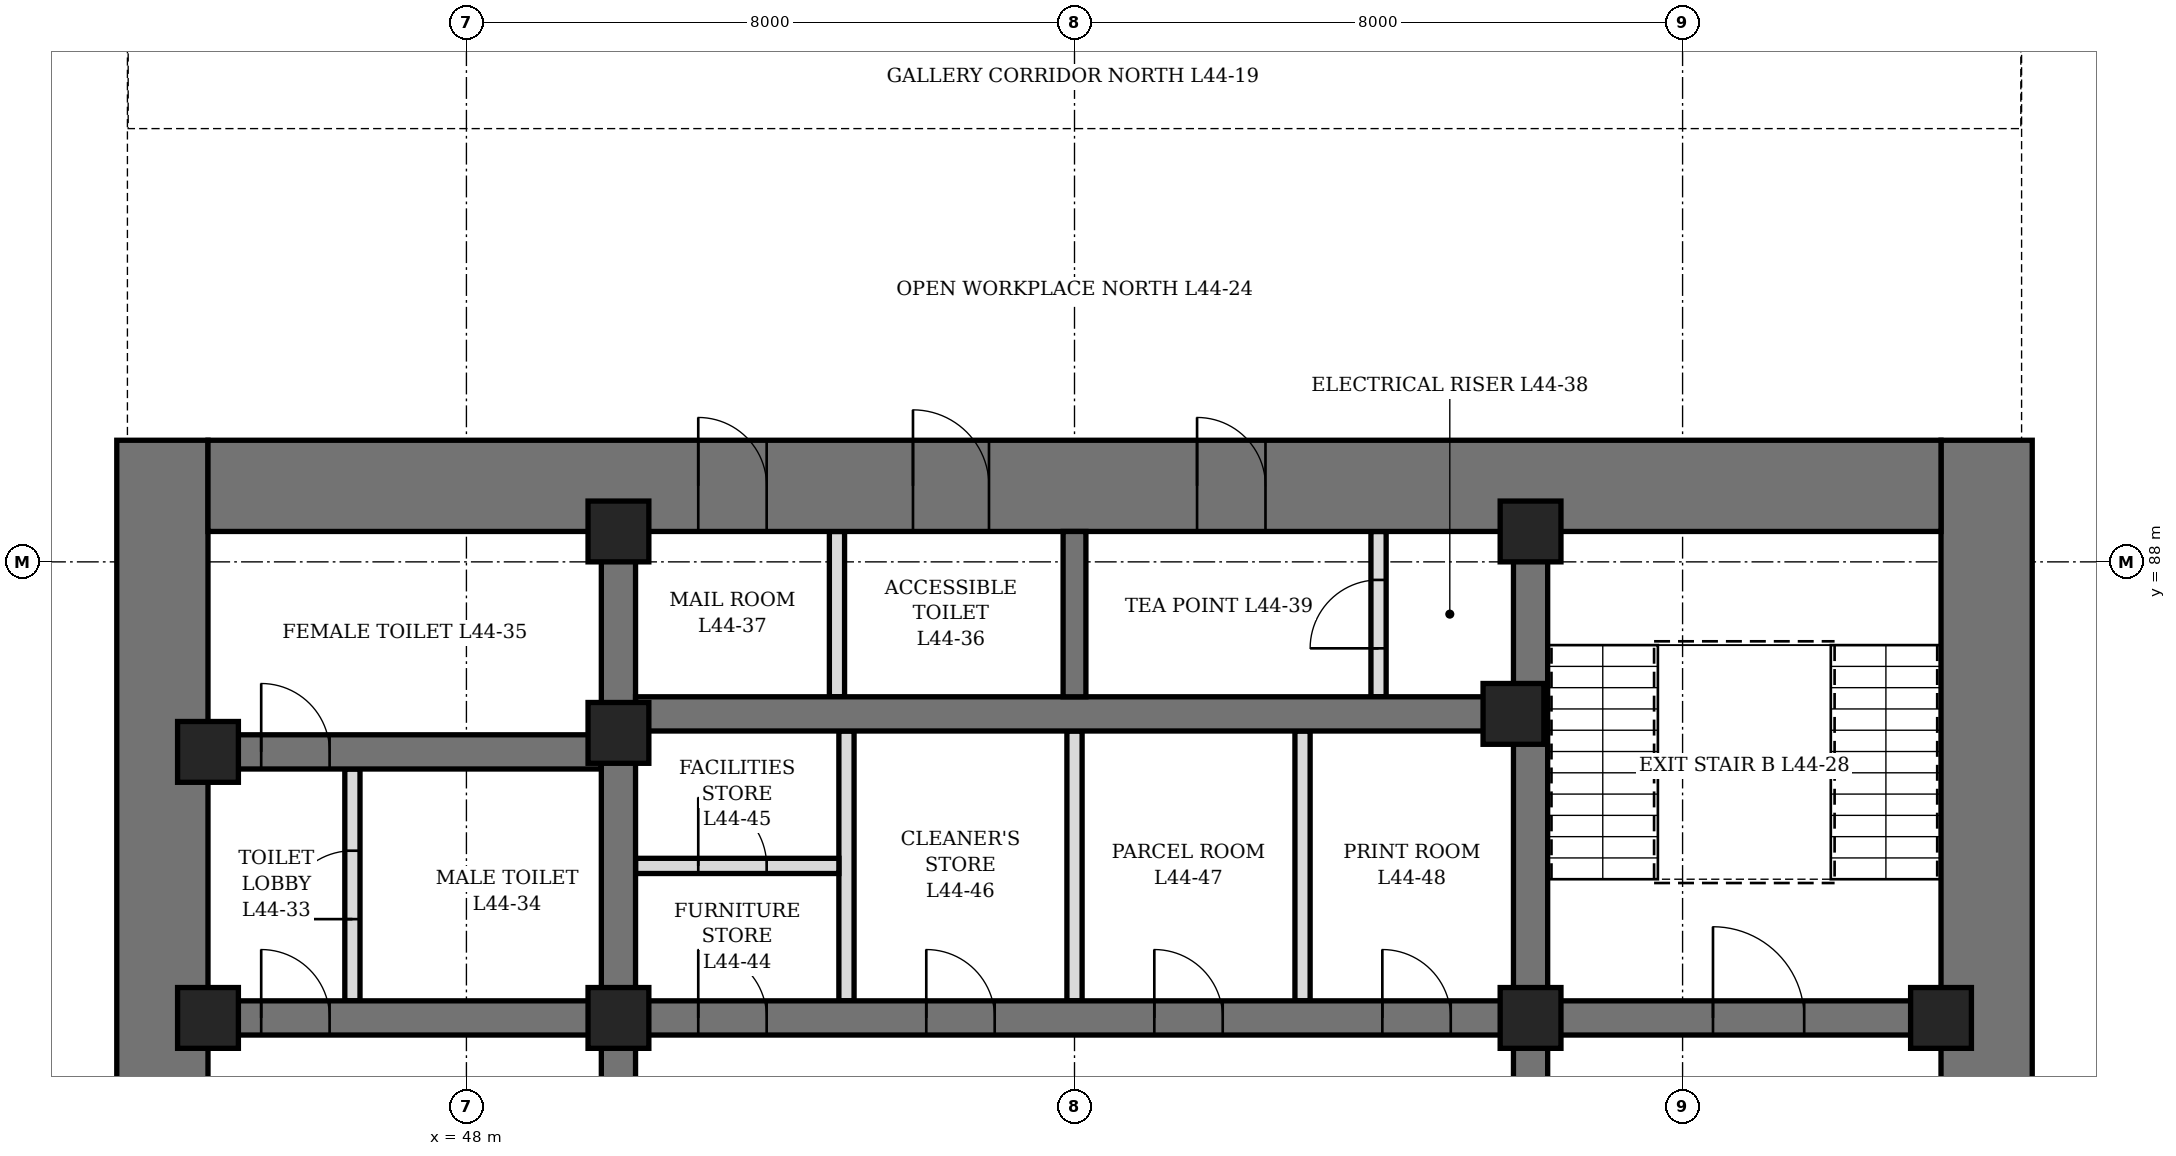
"""IFC4 building model, lengths in metres.
Left out: names, types, materials, properties, quantities, classifications, styles, units other than length and angle.
Written with IfcOpenShell. Run it as: python <this file> out.ifc"""

import sys

from ifc_helpers import new_model, si_unit, direction, frame, frame_2d, origin, origin_2d, place, context, subcontext, project, spatial, rectangle, hollow_rectangle, extrude, element, fill, save


model = new_model("IFC4")
c1 = context("Model", 3, precision=1e-05, world=origin(), true_north=direction((0.0, 1.0)))
c2 = subcontext(c1, "Body", "Model", "MODEL_VIEW")
j1 = project(units=[si_unit("LENGTHUNIT", "METRE"), si_unit("PLANEANGLEUNIT", "RADIAN")], contexts=[c1])
p1 = place(None, origin())
s1 = spatial("IfcSite", under=j1, at=p1, CompositionType="ELEMENT")
p2 = place(p1, origin())
s2 = spatial("IfcBuilding", under=s1, at=p2, CompositionType="ELEMENT")
p3 = place(p2, frame((0.0, 0.0, 198.1)))
s3 = spatial("IfcBuildingStorey", under=s2, at=p3, CompositionType="ELEMENT", Elevation=198.1)
p4 = place(p3, frame((44.0, 70.4, 0.0), z_axis=(0.0, 0.0, 1.0), x_axis=(0.0, 1.0, 0.0)))
e1 = element("IfcWall", 1, at=p4, inside=s3, PredefinedType="SHEAR", context=c2, shape_type="SweptSolid", body=[
    extrude(rectangle(XDim=19.2, YDim=1.2, at=frame_2d((9.6, 0.0))), origin(), (0.0, 0.0, 1.0), 4.2),
])
p5 = place(p4, frame((8.6, 0.0, 0.0)))
e2 = element("IfcOpeningElement", 2, at=p5, cuts=e1, PredefinedType="OPENING", context=c2, shape_type="SweptSolid", body=[
    extrude(rectangle(XDim=2.0, YDim=2.4, at=frame_2d((1.0, 1.2))), frame((0.0, 0.61, 0.0), z_axis=(0.0, -1.0, 0.0), x_axis=(1.0, 0.0, 0.0)), (0.0, 0.0, 1.0), 1.22),
])
p6 = place(p3, frame((68.0, 70.4, 0.0), z_axis=(0.0, 0.0, 1.0), x_axis=(0.0, 1.0, 0.0)))
e3 = element("IfcWall", 3, at=p6, inside=s3, PredefinedType="SHEAR", context=c2, shape_type="SweptSolid", body=[
    extrude(rectangle(XDim=19.2, YDim=1.2, at=frame_2d((9.6, 0.0))), origin(), (0.0, 0.0, 1.0), 4.2),
])
p7 = place(p6, frame((8.6, 0.0, 0.0)))
e4 = element("IfcOpeningElement", 4, at=p7, cuts=e3, PredefinedType="OPENING", context=c2, shape_type="SweptSolid", body=[
    extrude(rectangle(XDim=2.0, YDim=2.4, at=frame_2d((1.0, 1.2))), frame((0.0, 0.61, 0.0), z_axis=(0.0, -1.0, 0.0), x_axis=(1.0, 0.0, 0.0)), (0.0, 0.0, 1.0), 1.22),
])
p8 = place(p3, frame((44.6, 89.0, 0.0), z_axis=(0.0, 0.0, 1.0), x_axis=(1.0, 0.0, 0.0)))
e5 = element("IfcWall", 5, at=p8, inside=s3, PredefinedType="SHEAR", context=c2, shape_type="SweptSolid", body=[
    extrude(rectangle(XDim=22.8, YDim=1.2, at=frame_2d((11.4, 0.0))), origin(), (0.0, 0.0, 1.0), 4.2),
])
p9 = place(p8, frame((9.275, 0.0, 0.0)))
e6 = element("IfcOpeningElement", 6, at=p9, cuts=e5, PredefinedType="OPENING", context=c2, shape_type="SweptSolid", body=[
    extrude(rectangle(XDim=1.0, YDim=2.1, at=frame_2d((0.5, 1.05))), frame((0.0, 0.61, 0.0), z_axis=(0.0, -1.0, 0.0), x_axis=(1.0, 0.0, 0.0)), (0.0, 0.0, 1.0), 1.22),
])
p10 = place(p8, frame((6.45, 0.0, 0.0)))
e7 = element("IfcOpeningElement", 7, at=p10, cuts=e5, PredefinedType="OPENING", context=c2, shape_type="SweptSolid", body=[
    extrude(rectangle(XDim=0.9, YDim=2.1, at=frame_2d((0.45, 1.05))), frame((0.0, 0.61, 0.0), z_axis=(0.0, -1.0, 0.0), x_axis=(1.0, 0.0, 0.0)), (0.0, 0.0, 1.0), 1.22),
])
p11 = place(p8, frame((13.012, 0.0, 0.0)))
e8 = element("IfcOpeningElement", 8, at=p11, cuts=e5, PredefinedType="OPENING", context=c2, shape_type="SweptSolid", body=[
    extrude(rectangle(XDim=0.9, YDim=2.1, at=frame_2d((0.45, 1.05))), frame((0.0, 0.61, 0.0), z_axis=(0.0, -1.0, 0.0), x_axis=(1.0, 0.0, 0.0)), (0.0, 0.0, 1.0), 1.22),
])
p12 = place(p3, frame((50.0, 71.6, 0.0), z_axis=(0.0, 0.0, 1.0), x_axis=(0.0, 1.0, 0.0)))
e9 = element("IfcWall", 9, at=p12, inside=s3, PredefinedType="SHEAR", context=c2, shape_type="SweptSolid", body=[
    extrude(rectangle(XDim=16.8, YDim=0.45, at=frame_2d((8.4, 0.0))), origin(), (0.0, 0.0, 1.0), 4.2),
])
p13 = place(p12, frame((7.5, 0.0, 0.0)))
e10 = element("IfcOpeningElement", 10, at=p13, cuts=e9, PredefinedType="OPENING", context=c2, shape_type="SweptSolid", body=[
    extrude(rectangle(XDim=1.8, YDim=2.4, at=frame_2d((0.9, 1.2))), frame((0.0, 0.235, 0.0), z_axis=(0.0, -1.0, 0.0), x_axis=(1.0, 0.0, 0.0)), (0.0, 0.0, 1.0), 0.47),
])
p14 = place(p3, frame((62.0, 71.6, 0.0), z_axis=(0.0, 0.0, 1.0), x_axis=(0.0, 1.0, 0.0)))
e11 = element("IfcWall", 11, at=p14, inside=s3, PredefinedType="SHEAR", context=c2, shape_type="SweptSolid", body=[
    extrude(rectangle(XDim=16.8, YDim=0.45, at=frame_2d((8.4, 0.0))), origin(), (0.0, 0.0, 1.0), 4.2),
])
p15 = place(p14, frame((7.5, 0.0, 0.0)))
e12 = element("IfcOpeningElement", 12, at=p15, cuts=e11, PredefinedType="OPENING", context=c2, shape_type="SweptSolid", body=[
    extrude(rectangle(XDim=1.8, YDim=2.4, at=frame_2d((0.9, 1.2))), frame((0.0, 0.235, 0.0), z_axis=(0.0, -1.0, 0.0), x_axis=(1.0, 0.0, 0.0)), (0.0, 0.0, 1.0), 0.47),
])
p16 = place(p3, frame((44.6, 82.0, 0.0), z_axis=(0.0, 0.0, 1.0), x_axis=(1.0, 0.0, 0.0)))
e13 = element("IfcWall", 13, at=p16, inside=s3, PredefinedType="SHEAR", context=c2, shape_type="SweptSolid", body=[
    extrude(rectangle(XDim=5.175, YDim=0.45, at=frame_2d((2.587, 0.0))), origin(), (0.0, 0.0, 1.0), 4.2),
])
p17 = place(p16, frame((0.7, 0.0, 0.0)))
e14 = element("IfcOpeningElement", 14, at=p17, cuts=e13, PredefinedType="OPENING", context=c2, shape_type="SweptSolid", body=[
    extrude(rectangle(XDim=0.9, YDim=2.1, at=frame_2d((0.45, 1.05))), frame((0.0, 0.235, 0.0), z_axis=(0.0, -1.0, 0.0), x_axis=(1.0, 0.0, 0.0)), (0.0, 0.0, 1.0), 0.47),
])
p18 = place(p3, frame((44.6, 85.5, 0.0), z_axis=(0.0, 0.0, 1.0), x_axis=(1.0, 0.0, 0.0)))
e15 = element("IfcWall", 15, at=p18, inside=s3, PredefinedType="SHEAR", context=c2, shape_type="SweptSolid", body=[
    extrude(rectangle(XDim=5.175, YDim=0.45, at=frame_2d((2.587, 0.0))), origin(), (0.0, 0.0, 1.0), 4.2),
])
p19 = place(p18, frame((0.7, 0.0, 0.0)))
e16 = element("IfcOpeningElement", 16, at=p19, cuts=e15, PredefinedType="OPENING", context=c2, shape_type="SweptSolid", body=[
    extrude(rectangle(XDim=0.9, YDim=2.1, at=frame_2d((0.45, 1.05))), frame((0.0, 0.235, 0.0), z_axis=(0.0, -1.0, 0.0), x_axis=(1.0, 0.0, 0.0)), (0.0, 0.0, 1.0), 0.47),
])
p20 = place(p3, frame((62.225, 82.0, 0.0), z_axis=(0.0, 0.0, 1.0), x_axis=(1.0, 0.0, 0.0)))
e17 = element("IfcWall", 17, at=p20, inside=s3, PredefinedType="SHEAR", context=c2, shape_type="SweptSolid", body=[
    extrude(rectangle(XDim=5.175, YDim=0.45, at=frame_2d((2.587, 0.0))), origin(), (0.0, 0.0, 1.0), 4.2),
])
p21 = place(p20, frame((2.175, 0.0, 0.0)))
e18 = element("IfcOpeningElement", 18, at=p21, cuts=e17, PredefinedType="OPENING", context=c2, shape_type="SweptSolid", body=[
    extrude(rectangle(XDim=1.2, YDim=2.1, at=frame_2d((0.6, 1.05))), frame((0.0, 0.235, 0.0), z_axis=(0.0, -1.0, 0.0), x_axis=(1.0, 0.0, 0.0)), (0.0, 0.0, 1.0), 0.47),
])
p22 = place(p3, frame((50.225, 82.0, 0.0), z_axis=(0.0, 0.0, 1.0), x_axis=(1.0, 0.0, 0.0)))
e19 = element("IfcWall", 19, at=p22, inside=s3, PredefinedType="SHEAR", context=c2, shape_type="SweptSolid", body=[
    extrude(rectangle(XDim=11.55, YDim=0.45, at=frame_2d((5.775, 0.0))), origin(), (0.0, 0.0, 1.0), 4.2),
])
p23 = place(p22, frame((0.825, 0.0, 0.0)))
e20 = element("IfcOpeningElement", 20, at=p23, cuts=e19, PredefinedType="OPENING", context=c2, shape_type="SweptSolid", body=[
    extrude(rectangle(XDim=0.9, YDim=2.1, at=frame_2d((0.45, 1.05))), frame((0.0, 0.235, 0.0), z_axis=(0.0, -1.0, 0.0), x_axis=(1.0, 0.0, 0.0)), (0.0, 0.0, 1.0), 0.47),
])
p24 = place(p22, frame((3.825, 0.0, 0.0)))
e21 = element("IfcOpeningElement", 21, at=p24, cuts=e19, PredefinedType="OPENING", context=c2, shape_type="SweptSolid", body=[
    extrude(rectangle(XDim=0.9, YDim=2.1, at=frame_2d((0.45, 1.05))), frame((0.0, 0.235, 0.0), z_axis=(0.0, -1.0, 0.0), x_axis=(1.0, 0.0, 0.0)), (0.0, 0.0, 1.0), 0.47),
])
p25 = place(p22, frame((6.825, 0.0, 0.0)))
e22 = element("IfcOpeningElement", 22, at=p25, cuts=e19, PredefinedType="OPENING", context=c2, shape_type="SweptSolid", body=[
    extrude(rectangle(XDim=0.9, YDim=2.1, at=frame_2d((0.45, 1.05))), frame((0.0, 0.235, 0.0), z_axis=(0.0, -1.0, 0.0), x_axis=(1.0, 0.0, 0.0)), (0.0, 0.0, 1.0), 0.47),
])
p26 = place(p22, frame((9.825, 0.0, 0.0)))
e23 = element("IfcOpeningElement", 23, at=p26, cuts=e19, PredefinedType="OPENING", context=c2, shape_type="SweptSolid", body=[
    extrude(rectangle(XDim=0.9, YDim=2.1, at=frame_2d((0.45, 1.05))), frame((0.0, 0.235, 0.0), z_axis=(0.0, -1.0, 0.0), x_axis=(1.0, 0.0, 0.0)), (0.0, 0.0, 1.0), 0.47),
])
p27 = place(p3, frame((50.225, 86.0, 0.0), z_axis=(0.0, 0.0, 1.0), x_axis=(1.0, 0.0, 0.0)))
e24 = element("IfcWall", 24, at=p27, inside=s3, PredefinedType="SHEAR", context=c2, shape_type="SweptSolid", body=[
    extrude(rectangle(XDim=11.55, YDim=0.45, at=frame_2d((5.775, 0.0))), origin(), (0.0, 0.0, 1.0), 4.2),
])
p28 = place(p3, frame((56.0, 86.225, 0.0), z_axis=(0.0, 0.0, 1.0), x_axis=(0.0, 1.0, 0.0)))
e25 = element("IfcWall", 25, at=p28, inside=s3, PredefinedType="SHEAR", context=c2, shape_type="SweptSolid", body=[
    extrude(rectangle(XDim=2.175, YDim=0.3, at=frame_2d((1.087, 0.0))), origin(), (0.0, 0.0, 1.0), 4.2),
])
for number, where, z_axis, x_axis in (
    (26, (44.6, 82.0, 0.0), (0.0, 0.0, 1.0), (1.0, 0.0, 0.0)),
    (27, (44.6, 85.5, 0.0), (0.0, 0.0, 1.0), (1.0, 0.0, 0.0)),
    (28, (50.0, 82.0, 0.0), (0.0, 0.0, 1.0), (1.0, 0.0, 0.0)),
    (29, (50.0, 85.75, 0.0), (0.0, 0.0, 1.0), (1.0, 0.0, 0.0)),
    (30, (50.0, 88.4, 0.0), (0.0, 0.0, 1.0), (1.0, 0.0, 0.0)),
    (31, (61.775, 86.0, 0.0), (0.0, 0.0, 1.0), (1.0, 0.0, 0.0)),
    (32, (62.0, 82.0, 0.0), (0.0, 0.0, 1.0), (1.0, 0.0, 0.0)),
    (33, (62.0, 88.4, 0.0), (0.0, 0.0, 1.0), (1.0, 0.0, 0.0)),
    (34, (67.4, 82.0, 0.0), (0.0, 0.0, 1.0), (1.0, 0.0, 0.0)),
):
    element("IfcColumn", number, at=place(p3, frame(where, z_axis=z_axis, x_axis=x_axis)), inside=s3, PredefinedType="COLUMN", context=c2, shape_type="SweptSolid", body=[
        extrude(hollow_rectangle(XDim=0.8, YDim=0.8, WallThickness=0.1, at=origin_2d()), origin(), (0.0, 0.0, 1.0), 4.2),
    ])
p29 = place(p3, frame((46.5, 82.225, 0.0), z_axis=(0.0, 0.0, 1.0), x_axis=(0.0, 1.0, 0.0)))
e35 = element("IfcWall", 35, at=p29, inside=s3, PredefinedType="PARTITIONING", context=c2, shape_type="SweptSolid", body=[
    extrude(rectangle(XDim=3.05, YDim=0.2, at=frame_2d((1.525, 0.0))), origin(), (0.0, 0.0, 1.0), 4.04),
])
p30 = place(p29, frame((1.075, 0.0, 0.0)))
e36 = element("IfcOpeningElement", 36, at=p30, cuts=e35, PredefinedType="OPENING", context=c2, shape_type="SweptSolid", body=[
    extrude(rectangle(XDim=0.9, YDim=2.1, at=frame_2d((0.45, 1.05))), frame((0.0, 0.11, 0.0), z_axis=(0.0, -1.0, 0.0), x_axis=(1.0, 0.0, 0.0)), (0.0, 0.0, 1.0), 0.22),
])
p31 = place(p3, frame((52.875, 86.225, 0.0), z_axis=(0.0, 0.0, 1.0), x_axis=(0.0, 1.0, 0.0)))
e37 = element("IfcWall", 37, at=p31, inside=s3, PredefinedType="PARTITIONING", context=c2, shape_type="SweptSolid", body=[
    extrude(rectangle(XDim=2.175, YDim=0.2, at=frame_2d((1.087, 0.0))), origin(), (0.0, 0.0, 1.0), 4.04),
])
p32 = place(p3, frame((60.0, 86.225, 0.0), z_axis=(0.0, 0.0, 1.0), x_axis=(0.0, 1.0, 0.0)))
e38 = element("IfcWall", 38, at=p32, inside=s3, PredefinedType="PARTITIONING", context=c2, shape_type="SweptSolid", body=[
    extrude(rectangle(XDim=2.175, YDim=0.2, at=frame_2d((1.087, 0.0))), origin(), (0.0, 0.0, 1.0), 4.04),
])
p33 = place(p32, frame((0.637, 0.0, 0.0)))
e39 = element("IfcOpeningElement", 39, at=p33, cuts=e38, PredefinedType="OPENING", context=c2, shape_type="SweptSolid", body=[
    extrude(rectangle(XDim=0.9, YDim=2.1, at=frame_2d((0.45, 1.05))), frame((0.0, 0.11, 0.0), z_axis=(0.0, -1.0, 0.0), x_axis=(1.0, 0.0, 0.0)), (0.0, 0.0, 1.0), 0.22),
])
p34 = place(p3, frame((53.0, 82.225, 0.0), z_axis=(0.0, 0.0, 1.0), x_axis=(0.0, 1.0, 0.0)))
e40 = element("IfcWall", 40, at=p34, inside=s3, PredefinedType="PARTITIONING", context=c2, shape_type="SweptSolid", body=[
    extrude(rectangle(XDim=3.55, YDim=0.2, at=frame_2d((1.775, 0.0))), origin(), (0.0, 0.0, 1.0), 4.04),
])
p35 = place(p3, frame((50.225, 84.0, 0.0), z_axis=(0.0, 0.0, 1.0), x_axis=(1.0, 0.0, 0.0)))
e41 = element("IfcWall", 41, at=p35, inside=s3, PredefinedType="PARTITIONING", context=c2, shape_type="SweptSolid", body=[
    extrude(rectangle(XDim=2.675, YDim=0.2, at=frame_2d((1.337, 0.0))), origin(), (0.0, 0.0, 1.0), 4.04),
])
p36 = place(p35, frame((0.825, 0.0, 0.0)))
e42 = element("IfcOpeningElement", 42, at=p36, cuts=e41, PredefinedType="OPENING", context=c2, shape_type="SweptSolid", body=[
    extrude(rectangle(XDim=0.9, YDim=2.1, at=frame_2d((0.45, 1.05))), frame((0.0, 0.11, 0.0), z_axis=(0.0, -1.0, 0.0), x_axis=(1.0, 0.0, 0.0)), (0.0, 0.0, 1.0), 0.22),
])
p37 = place(p3, frame((56.0, 82.225, 0.0), z_axis=(0.0, 0.0, 1.0), x_axis=(0.0, 1.0, 0.0)))
e43 = element("IfcWall", 43, at=p37, inside=s3, PredefinedType="PARTITIONING", context=c2, shape_type="SweptSolid", body=[
    extrude(rectangle(XDim=3.55, YDim=0.2, at=frame_2d((1.775, 0.0))), origin(), (0.0, 0.0, 1.0), 3.14),
])
p38 = place(p3, frame((59.0, 82.225, 0.0), z_axis=(0.0, 0.0, 1.0), x_axis=(0.0, 1.0, 0.0)))
e44 = element("IfcWall", 44, at=p38, inside=s3, PredefinedType="PARTITIONING", context=c2, shape_type="SweptSolid", body=[
    extrude(rectangle(XDim=3.55, YDim=0.2, at=frame_2d((1.775, 0.0))), origin(), (0.0, 0.0, 1.0), 4.04),
])
p39 = place(p17, origin())
e45 = element("IfcDoor", 45, at=p39, inside=s3, OperationType="SINGLE_SWING_LEFT", PredefinedType="DOOR", context=c2, shape_type="SweptSolid", body=[
    extrude(rectangle(XDim=0.9, YDim=2.1, at=frame_2d((0.45, 1.05))), frame((0.0, 0.225, 0.0), z_axis=(0.0, -1.0, 0.0), x_axis=(1.0, 0.0, 0.0)), (0.0, 0.0, 1.0), 0.449),
])
fill(e14, e45)
p40 = place(p30, origin())
e46 = element("IfcDoor", 46, at=p40, inside=s3, OperationType="SINGLE_SWING_RIGHT", PredefinedType="DOOR", context=c2, shape_type="SweptSolid", body=[
    extrude(rectangle(XDim=0.9, YDim=2.1, at=frame_2d((0.45, 1.05))), frame((0.0, 0.1, 0.0), z_axis=(0.0, -1.0, 0.0), x_axis=(1.0, 0.0, 0.0)), (0.0, 0.0, 1.0), 0.199),
])
fill(e36, e46)
p41 = place(p19, origin())
e47 = element("IfcDoor", 47, at=p41, inside=s3, OperationType="SINGLE_SWING_RIGHT", PredefinedType="DOOR", context=c2, shape_type="SweptSolid", body=[
    extrude(rectangle(XDim=0.9, YDim=2.1, at=frame_2d((0.45, 1.05))), frame((0.0, 0.225, 0.0), z_axis=(0.0, -1.0, 0.0), x_axis=(1.0, 0.0, 0.0)), (0.0, 0.0, 1.0), 0.449),
])
fill(e16, e47)
p42 = place(p9, origin())
e48 = element("IfcDoor", 48, at=p42, inside=s3, OperationType="SINGLE_SWING_LEFT", PredefinedType="DOOR", context=c2, shape_type="SweptSolid", body=[
    extrude(rectangle(XDim=1.0, YDim=2.1, at=frame_2d((0.5, 1.05))), frame((0.0, 0.35, 0.0), z_axis=(0.0, -1.0, 0.0), x_axis=(1.0, 0.0, 0.0)), (0.0, 0.0, 1.0), 0.7),
])
fill(e6, e48)
p43 = place(p10, origin())
e49 = element("IfcDoor", 49, at=p43, inside=s3, OperationType="SINGLE_SWING_LEFT", PredefinedType="DOOR", context=c2, shape_type="SweptSolid", body=[
    extrude(rectangle(XDim=0.9, YDim=2.1, at=frame_2d((0.45, 1.05))), frame((0.0, 0.35, 0.0), z_axis=(0.0, -1.0, 0.0), x_axis=(1.0, 0.0, 0.0)), (0.0, 0.0, 1.0), 0.7),
])
fill(e7, e49)
p44 = place(p11, origin())
e50 = element("IfcDoor", 50, at=p44, inside=s3, OperationType="SINGLE_SWING_LEFT", PredefinedType="DOOR", context=c2, shape_type="SweptSolid", body=[
    extrude(rectangle(XDim=0.9, YDim=2.1, at=frame_2d((0.45, 1.05))), frame((0.0, 0.35, 0.0), z_axis=(0.0, -1.0, 0.0), x_axis=(1.0, 0.0, 0.0)), (0.0, 0.0, 1.0), 0.7),
])
fill(e8, e50)
p45 = place(p33, origin())
e51 = element("IfcDoor", 51, at=p45, inside=s3, OperationType="SINGLE_SWING_LEFT", PredefinedType="DOOR", context=c2, shape_type="SweptSolid", body=[
    extrude(rectangle(XDim=0.9, YDim=2.1, at=frame_2d((0.45, 1.05))), frame((0.0, 0.1, 0.0), z_axis=(0.0, -1.0, 0.0), x_axis=(1.0, 0.0, 0.0)), (0.0, 0.0, 1.0), 0.199),
])
fill(e39, e51)
p46 = place(p23, origin())
e52 = element("IfcDoor", 52, at=p46, inside=s3, OperationType="SINGLE_SWING_LEFT", PredefinedType="DOOR", context=c2, shape_type="SweptSolid", body=[
    extrude(rectangle(XDim=0.9, YDim=2.1, at=frame_2d((0.45, 1.05))), frame((0.0, 0.225, 0.0), z_axis=(0.0, -1.0, 0.0), x_axis=(1.0, 0.0, 0.0)), (0.0, 0.0, 1.0), 0.449),
])
fill(e20, e52)
p47 = place(p36, origin())
e53 = element("IfcDoor", 53, at=p47, inside=s3, OperationType="SINGLE_SWING_LEFT", PredefinedType="DOOR", context=c2, shape_type="SweptSolid", body=[
    extrude(rectangle(XDim=0.9, YDim=2.1, at=frame_2d((0.45, 1.05))), frame((0.0, 0.1, 0.0), z_axis=(0.0, -1.0, 0.0), x_axis=(1.0, 0.0, 0.0)), (0.0, 0.0, 1.0), 0.199),
])
fill(e42, e53)
p48 = place(p24, origin())
e54 = element("IfcDoor", 54, at=p48, inside=s3, OperationType="SINGLE_SWING_LEFT", PredefinedType="DOOR", context=c2, shape_type="SweptSolid", body=[
    extrude(rectangle(XDim=0.9, YDim=2.1, at=frame_2d((0.45, 1.05))), frame((0.0, 0.225, 0.0), z_axis=(0.0, -1.0, 0.0), x_axis=(1.0, 0.0, 0.0)), (0.0, 0.0, 1.0), 0.449),
])
fill(e21, e54)
p49 = place(p25, origin())
e55 = element("IfcDoor", 55, at=p49, inside=s3, OperationType="SINGLE_SWING_LEFT", PredefinedType="DOOR", context=c2, shape_type="SweptSolid", body=[
    extrude(rectangle(XDim=0.9, YDim=2.1, at=frame_2d((0.45, 1.05))), frame((0.0, 0.225, 0.0), z_axis=(0.0, -1.0, 0.0), x_axis=(1.0, 0.0, 0.0)), (0.0, 0.0, 1.0), 0.449),
])
fill(e22, e55)
p50 = place(p26, origin())
e56 = element("IfcDoor", 56, at=p50, inside=s3, OperationType="SINGLE_SWING_LEFT", PredefinedType="DOOR", context=c2, shape_type="SweptSolid", body=[
    extrude(rectangle(XDim=0.9, YDim=2.1, at=frame_2d((0.45, 1.05))), frame((0.0, 0.225, 0.0), z_axis=(0.0, -1.0, 0.0), x_axis=(1.0, 0.0, 0.0)), (0.0, 0.0, 1.0), 0.449),
])
fill(e23, e56)
p51 = place(p21, origin())
e57 = element("IfcDoor", 57, at=p51, inside=s3, OperationType="SINGLE_SWING_LEFT", PredefinedType="DOOR", context=c2, shape_type="SweptSolid", body=[
    extrude(rectangle(XDim=1.2, YDim=2.1, at=frame_2d((0.6, 1.05))), frame((0.0, 0.225, 0.0), z_axis=(0.0, -1.0, 0.0), x_axis=(1.0, 0.0, 0.0)), (0.0, 0.0, 1.0), 0.449),
])
fill(e18, e57)
save(model, sys.argv[1])
